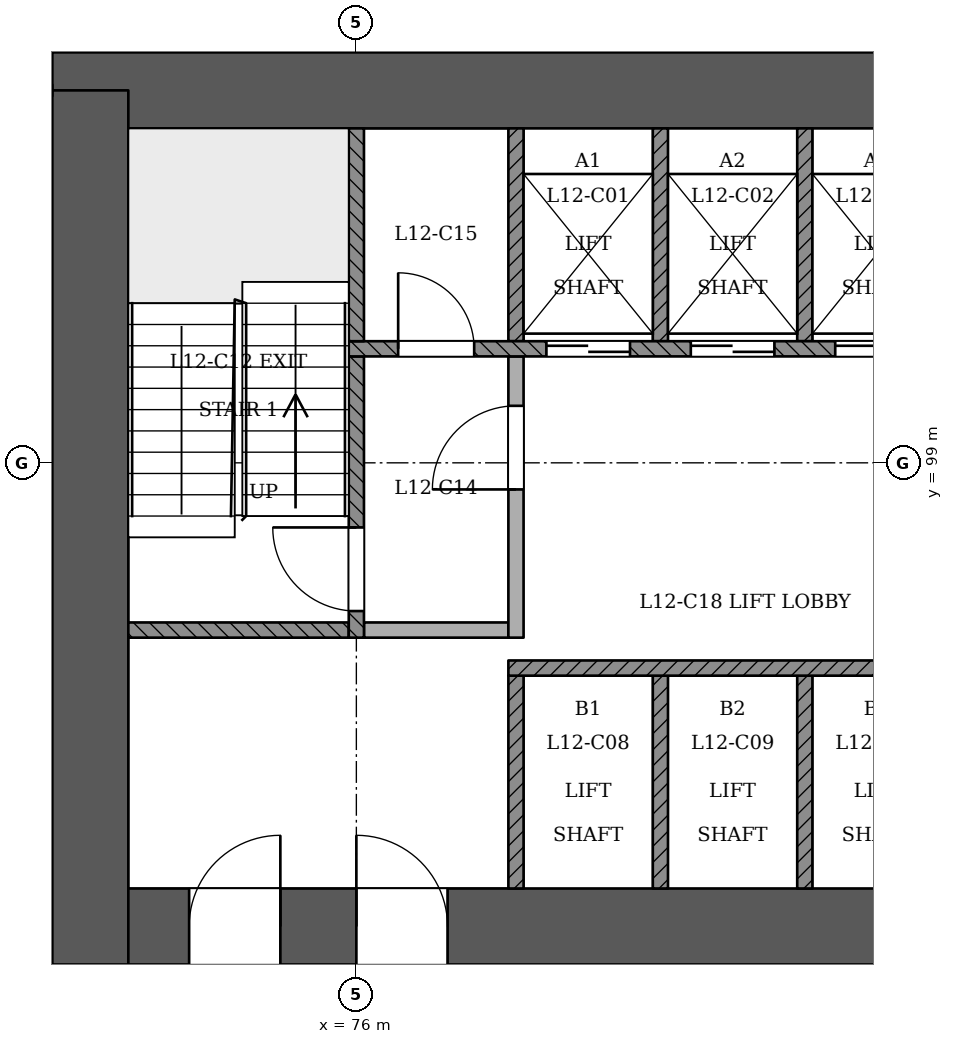
"""IFC4 building model, lengths in metres.
Left out: names, types, materials, properties, quantities, classifications, styles, units other than length and angle.
Written with IfcOpenShell. Run it as: python <this file> out.ifc"""

import sys

from ifc_helpers import new_model, si_unit, direction, frame, frame_2d, origin, place, context, subcontext, project, spatial, rectangle, extrude, element, fill, save


model = new_model("IFC4")
c1 = context("Model", 3, precision=1e-05, world=origin(), true_north=direction((0.0, 1.0)))
c2 = subcontext(c1, "Body", "Model", "MODEL_VIEW")
j1 = project(units=[si_unit("LENGTHUNIT", "METRE"), si_unit("PLANEANGLEUNIT", "RADIAN")], contexts=[c1])
p1 = place(None, origin())
s1 = spatial("IfcSite", under=j1, at=p1, CompositionType="ELEMENT")
p2 = place(p1, origin())
s2 = spatial("IfcBuilding", under=s1, at=p2, CompositionType="ELEMENT")
p3 = place(p2, frame((0.0, 0.0, 52.2)))
s3 = spatial("IfcBuildingStorey", under=s2, at=p3, CompositionType="ELEMENT", Elevation=52.2)
p4 = place(p3, frame((72.5, 92.9, 0.0), z_axis=(0.0, 0.0, 1.0), x_axis=(1.0, 0.0, 0.0)))
e1 = element("IfcWall", 1, at=p4, inside=s3, PredefinedType="SHEAR", context=c2, shape_type="SweptSolid", body=[
    extrude(rectangle(XDim=25.5, YDim=1.0, at=frame_2d((12.75, 0.0))), origin(), (0.0, 0.0, 1.0), 3.6),
])
p5 = place(p4, frame((1.3, 0.0, 0.0)))
e2 = element("IfcOpeningElement", 2, at=p5, cuts=e1, PredefinedType="OPENING", context=c2, shape_type="SweptSolid", body=[
    extrude(rectangle(XDim=1.2, YDim=2.1, at=frame_2d((0.6, 1.05))), frame((0.0, 0.51, 0.0), z_axis=(0.0, -1.0, 0.0), x_axis=(1.0, 0.0, 0.0)), (0.0, 0.0, 1.0), 1.021),
])
p6 = place(p4, frame((3.5, 0.0, 0.0)))
e3 = element("IfcOpeningElement", 3, at=p6, cuts=e1, PredefinedType="OPENING", context=c2, shape_type="SweptSolid", body=[
    extrude(rectangle(XDim=1.2, YDim=2.1, at=frame_2d((0.6, 1.05))), frame((0.0, 0.51, 0.0), z_axis=(0.0, -1.0, 0.0), x_axis=(1.0, 0.0, 0.0)), (0.0, 0.0, 1.0), 1.021),
])
p7 = place(p4, frame((13.5, 0.0, 0.0)))
e4 = element("IfcOpeningElement", 4, at=p7, cuts=e1, PredefinedType="OPENING", context=c2, shape_type="SweptSolid", body=[
    extrude(rectangle(XDim=1.2, YDim=2.1, at=frame_2d((0.6, 1.05))), frame((0.0, 0.51, 0.0), z_axis=(0.0, -1.0, 0.0), x_axis=(1.0, 0.0, 0.0)), (0.0, 0.0, 1.0), 1.021),
])
p8 = place(p4, frame((15.462, 0.0, 0.0)))
e5 = element("IfcOpeningElement", 5, at=p8, cuts=e1, PredefinedType="OPENING", context=c2, shape_type="SweptSolid", body=[
    extrude(rectangle(XDim=1.0, YDim=2.1, at=frame_2d((0.5, 1.05))), frame((0.0, 0.51, 0.0), z_axis=(0.0, -1.0, 0.0), x_axis=(1.0, 0.0, 0.0)), (0.0, 0.0, 1.0), 1.021),
])
p9 = place(p4, frame((18.3, 0.0, 0.0)))
e6 = element("IfcOpeningElement", 6, at=p9, cuts=e1, PredefinedType="OPENING", context=c2, shape_type="SweptSolid", body=[
    extrude(rectangle(XDim=1.0, YDim=2.1, at=frame_2d((0.5, 1.05))), frame((0.0, 0.51, 0.0), z_axis=(0.0, -1.0, 0.0), x_axis=(1.0, 0.0, 0.0)), (0.0, 0.0, 1.0), 1.021),
])
p10 = place(p4, frame((21.2, 0.0, 0.0)))
e7 = element("IfcOpeningElement", 7, at=p10, cuts=e1, PredefinedType="OPENING", context=c2, shape_type="SweptSolid", body=[
    extrude(rectangle(XDim=1.0, YDim=2.1, at=frame_2d((0.5, 1.05))), frame((0.0, 0.51, 0.0), z_axis=(0.0, -1.0, 0.0), x_axis=(1.0, 0.0, 0.0)), (0.0, 0.0, 1.0), 1.021),
])
p11 = place(p4, frame((23.087, 0.0, 0.0)))
e8 = element("IfcOpeningElement", 8, at=p11, cuts=e1, PredefinedType="OPENING", context=c2, shape_type="SweptSolid", body=[
    extrude(rectangle(XDim=1.0, YDim=2.1, at=frame_2d((0.5, 1.05))), frame((0.0, 0.51, 0.0), z_axis=(0.0, -1.0, 0.0), x_axis=(1.0, 0.0, 0.0)), (0.0, 0.0, 1.0), 1.021),
])
p12 = place(p3, frame((97.5, 103.9, 0.0), z_axis=(0.0, 0.0, 1.0), x_axis=(-1.0, 0.0, 0.0)))
e9 = element("IfcWall", 9, at=p12, inside=s3, PredefinedType="SHEAR", context=c2, shape_type="SweptSolid", body=[
    extrude(rectangle(XDim=25.5, YDim=1.0, at=frame_2d((12.75, 0.0))), origin(), (0.0, 0.0, 1.0), 3.6),
])
p13 = place(p3, frame((72.5, 103.9, 0.0), z_axis=(0.0, 0.0, 1.0), x_axis=(0.0, -1.0, 0.0)))
e10 = element("IfcWall", 10, at=p13, inside=s3, PredefinedType="SHEAR", context=c2, shape_type="SweptSolid", body=[
    extrude(rectangle(XDim=11.5, YDim=1.0, at=frame_2d((5.75, 0.0))), origin(), (0.0, 0.0, 1.0), 3.6),
])
p14 = place(p3, frame((64.002, 93.308, 0.0), z_axis=(0.0, 0.0, 1.0), x_axis=(0.49999948646, -0.866025700277, 0.0)))
e11 = element("IfcWall", 11, at=p14, inside=s3, PredefinedType="PARTITIONING", context=c2, shape_type="SweptSolid", body=[
    extrude(rectangle(XDim=38.6, YDim=0.15, at=frame_2d((19.3, 0.0))), origin(), (0.0, 0.0, 1.0), 2.7),
])
p15 = place(p14, frame((0.605, 0.0, 0.0)))
e12 = element("IfcOpeningElement", 12, at=p15, cuts=e11, PredefinedType="OPENING", context=c2, shape_type="SweptSolid", body=[
    extrude(rectangle(XDim=1.0, YDim=2.1, at=frame_2d((0.5, 1.05))), frame((0.0, 0.085, 0.0), z_axis=(0.0, -1.0, 0.0), x_axis=(1.0, 0.0, 0.0)), (0.0, 0.0, 1.0), 0.171),
])
p16 = place(p14, frame((7.28, 0.0, 0.0)))
e13 = element("IfcOpeningElement", 13, at=p16, cuts=e11, PredefinedType="OPENING", context=c2, shape_type="SweptSolid", body=[
    extrude(rectangle(XDim=1.0, YDim=2.1, at=frame_2d((0.5, 1.05))), frame((0.0, 0.085, 0.0), z_axis=(0.0, -1.0, 0.0), x_axis=(1.0, 0.0, 0.0)), (0.0, 0.0, 1.0), 0.171),
])
p17 = place(p14, frame((9.72, 0.0, 0.0)))
e14 = element("IfcOpeningElement", 14, at=p17, cuts=e11, PredefinedType="OPENING", context=c2, shape_type="SweptSolid", body=[
    extrude(rectangle(XDim=1.0, YDim=2.1, at=frame_2d((0.5, 1.05))), frame((0.0, 0.085, 0.0), z_axis=(0.0, -1.0, 0.0), x_axis=(1.0, 0.0, 0.0)), (0.0, 0.0, 1.0), 0.171),
])
p18 = place(p14, frame((16.395, 0.0, 0.0)))
e15 = element("IfcOpeningElement", 15, at=p18, cuts=e11, PredefinedType="OPENING", context=c2, shape_type="SweptSolid", body=[
    extrude(rectangle(XDim=1.0, YDim=2.1, at=frame_2d((0.5, 1.05))), frame((0.0, 0.085, 0.0), z_axis=(0.0, -1.0, 0.0), x_axis=(1.0, 0.0, 0.0)), (0.0, 0.0, 1.0), 0.171),
])
p19 = place(p14, frame((18.72, 0.0, 0.0)))
e16 = element("IfcOpeningElement", 16, at=p19, cuts=e11, PredefinedType="OPENING", context=c2, shape_type="SweptSolid", body=[
    extrude(rectangle(XDim=1.0, YDim=2.1, at=frame_2d((0.5, 1.05))), frame((0.0, 0.085, 0.0), z_axis=(0.0, -1.0, 0.0), x_axis=(1.0, 0.0, 0.0)), (0.0, 0.0, 1.0), 0.171),
])
p20 = place(p14, frame((25.395, 0.0, 0.0)))
e17 = element("IfcOpeningElement", 17, at=p20, cuts=e11, PredefinedType="OPENING", context=c2, shape_type="SweptSolid", body=[
    extrude(rectangle(XDim=1.0, YDim=2.1, at=frame_2d((0.5, 1.05))), frame((0.0, 0.085, 0.0), z_axis=(0.0, -1.0, 0.0), x_axis=(1.0, 0.0, 0.0)), (0.0, 0.0, 1.0), 0.171),
])
p21 = place(p14, frame((27.605, 0.0, 0.0)))
e18 = element("IfcOpeningElement", 18, at=p21, cuts=e11, PredefinedType="OPENING", context=c2, shape_type="SweptSolid", body=[
    extrude(rectangle(XDim=1.0, YDim=2.1, at=frame_2d((0.5, 1.05))), frame((0.0, 0.085, 0.0), z_axis=(0.0, -1.0, 0.0), x_axis=(1.0, 0.0, 0.0)), (0.0, 0.0, 1.0), 0.171),
])
p22 = place(p14, frame((34.28, 0.0, 0.0)))
e19 = element("IfcOpeningElement", 19, at=p22, cuts=e11, PredefinedType="OPENING", context=c2, shape_type="SweptSolid", body=[
    extrude(rectangle(XDim=1.0, YDim=2.1, at=frame_2d((0.5, 1.05))), frame((0.0, 0.085, 0.0), z_axis=(0.0, -1.0, 0.0), x_axis=(1.0, 0.0, 0.0)), (0.0, 0.0, 1.0), 0.171),
])
p23 = place(p14, frame((37.324, 0.0, 0.0)))
e20 = element("IfcOpeningElement", 20, at=p23, cuts=e11, PredefinedType="OPENING", context=c2, shape_type="SweptSolid", body=[
    extrude(rectangle(XDim=1.0, YDim=2.1, at=frame_2d((0.5, 1.05))), frame((0.0, 0.085, 0.0), z_axis=(0.0, -1.0, 0.0), x_axis=(1.0, 0.0, 0.0)), (0.0, 0.0, 1.0), 0.171),
])
for number, where, z_axis, x_axis in (
    (21, (78.1, 93.4, 0.0), (0.0, 0.0, 1.0), (0.0, 1.0, 0.0)),
    (22, (80.0, 93.4, 0.0), (0.0, 0.0, 1.0), (0.0, 1.0, 0.0)),
    (23, (81.9, 93.4, 0.0), (0.0, 0.0, 1.0), (0.0, 1.0, 0.0)),
):
    element("IfcWall", number, at=place(p3, frame(where, z_axis=z_axis, x_axis=x_axis)), inside=s3, PredefinedType="SOLIDWALL", context=c2, shape_type="SweptSolid", body=[
        extrude(rectangle(XDim=2.8, YDim=0.2, at=frame_2d((1.4, 0.0))), origin(), (0.0, 0.0, 1.0), 3.1),
    ])
p24 = place(p3, frame((78.0, 96.3, 0.0), z_axis=(0.0, 0.0, 1.0), x_axis=(1.0, 0.0, 0.0)))
e24 = element("IfcWall", 24, at=p24, inside=s3, PredefinedType="SOLIDWALL", context=c2, shape_type="SweptSolid", body=[
    extrude(rectangle(XDim=7.8, YDim=0.2, at=frame_2d((3.9, 0.0))), origin(), (0.0, 0.0, 1.0), 3.1),
])
p25 = place(p3, frame((73.0, 96.8, 0.0), z_axis=(0.0, 0.0, 1.0), x_axis=(1.0, 0.0, 0.0)))
e25 = element("IfcWall", 25, at=p25, inside=s3, PredefinedType="SOLIDWALL", context=c2, shape_type="SweptSolid", body=[
    extrude(rectangle(XDim=2.9, YDim=0.2, at=frame_2d((1.45, 0.0))), origin(), (0.0, 0.0, 1.0), 3.1),
])
p26 = place(p3, frame((76.0, 96.7, 0.0), z_axis=(0.0, 0.0, 1.0), x_axis=(0.0, 1.0, 0.0)))
e26 = element("IfcWall", 26, at=p26, inside=s3, PredefinedType="SOLIDWALL", context=c2, shape_type="SweptSolid", body=[
    extrude(rectangle(XDim=3.7, YDim=0.2, at=frame_2d((1.85, 0.0))), origin(), (0.0, 0.0, 1.0), 3.1),
])
p27 = place(p26, frame((0.35, 0.0, 0.0)))
e27 = element("IfcOpeningElement", 27, at=p27, cuts=e26, PredefinedType="OPENING", context=c2, shape_type="SweptSolid", body=[
    extrude(rectangle(XDim=1.1, YDim=2.1, at=frame_2d((0.55, 1.05))), frame((0.0, 0.11, 0.0), z_axis=(0.0, -1.0, 0.0), x_axis=(1.0, 0.0, 0.0)), (0.0, 0.0, 1.0), 0.221),
])
p28 = place(p3, frame((76.1, 96.8, 0.0), z_axis=(0.0, 0.0, 1.0), x_axis=(1.0, 0.0, 0.0)))
e28 = element("IfcWall", 28, at=p28, inside=s3, PredefinedType="PARTITIONING", context=c2, shape_type="SweptSolid", body=[
    extrude(rectangle(XDim=1.9, YDim=0.2, at=frame_2d((0.95, 0.0))), origin(), (0.0, 0.0, 1.0), 3.1),
])
p29 = place(p3, frame((78.1, 96.7, 0.0), z_axis=(0.0, 0.0, 1.0), x_axis=(0.0, 1.0, 0.0)))
e29 = element("IfcWall", 29, at=p29, inside=s3, PredefinedType="PARTITIONING", context=c2, shape_type="SweptSolid", body=[
    extrude(rectangle(XDim=3.7, YDim=0.2, at=frame_2d((1.85, 0.0))), origin(), (0.0, 0.0, 1.0), 3.1),
])
p30 = place(p29, frame((1.95, 0.0, 0.0)))
e30 = element("IfcOpeningElement", 30, at=p30, cuts=e29, PredefinedType="OPENING", context=c2, shape_type="SweptSolid", body=[
    extrude(rectangle(XDim=1.1, YDim=2.1, at=frame_2d((0.55, 1.05))), frame((0.0, 0.11, 0.0), z_axis=(0.0, -1.0, 0.0), x_axis=(1.0, 0.0, 0.0)), (0.0, 0.0, 1.0), 0.221),
])
p31 = place(p3, frame((75.9, 100.5, 0.0), z_axis=(0.0, 0.0, 1.0), x_axis=(1.0, 0.0, 0.0)))
e31 = element("IfcWall", 31, at=p31, inside=s3, PredefinedType="SOLIDWALL", context=c2, shape_type="SweptSolid", body=[
    extrude(rectangle(XDim=18.2, YDim=0.2, at=frame_2d((9.1, 0.0))), origin(), (0.0, 0.0, 1.0), 3.1),
])
p32 = place(p31, frame((2.6, 0.0, 0.0)))
e32 = element("IfcOpeningElement", 32, at=p32, cuts=e31, PredefinedType="OPENING", context=c2, shape_type="SweptSolid", body=[
    extrude(rectangle(XDim=1.1, YDim=2.1, at=frame_2d((0.55, 1.05))), frame((0.0, 0.11, 0.0), z_axis=(0.0, -1.0, 0.0), x_axis=(1.0, 0.0, 0.0)), (0.0, 0.0, 1.0), 0.221),
])
p33 = place(p31, frame((4.5, 0.0, 0.0)))
e33 = element("IfcOpeningElement", 33, at=p33, cuts=e31, PredefinedType="OPENING", context=c2, shape_type="SweptSolid", body=[
    extrude(rectangle(XDim=1.1, YDim=2.1, at=frame_2d((0.55, 1.05))), frame((0.0, 0.11, 0.0), z_axis=(0.0, -1.0, 0.0), x_axis=(1.0, 0.0, 0.0)), (0.0, 0.0, 1.0), 0.221),
])
p34 = place(p31, frame((6.4, 0.0, 0.0)))
e34 = element("IfcOpeningElement", 34, at=p34, cuts=e31, PredefinedType="OPENING", context=c2, shape_type="SweptSolid", body=[
    extrude(rectangle(XDim=1.1, YDim=2.1, at=frame_2d((0.55, 1.05))), frame((0.0, 0.11, 0.0), z_axis=(0.0, -1.0, 0.0), x_axis=(1.0, 0.0, 0.0)), (0.0, 0.0, 1.0), 0.221),
])
p35 = place(p31, frame((8.3, 0.0, 0.0)))
e35 = element("IfcOpeningElement", 35, at=p35, cuts=e31, PredefinedType="OPENING", context=c2, shape_type="SweptSolid", body=[
    extrude(rectangle(XDim=1.1, YDim=2.1, at=frame_2d((0.55, 1.05))), frame((0.0, 0.11, 0.0), z_axis=(0.0, -1.0, 0.0), x_axis=(1.0, 0.0, 0.0)), (0.0, 0.0, 1.0), 0.221),
])
p36 = place(p31, frame((10.2, 0.0, 0.0)))
e36 = element("IfcOpeningElement", 36, at=p36, cuts=e31, PredefinedType="OPENING", context=c2, shape_type="SweptSolid", body=[
    extrude(rectangle(XDim=1.1, YDim=2.1, at=frame_2d((0.55, 1.05))), frame((0.0, 0.11, 0.0), z_axis=(0.0, -1.0, 0.0), x_axis=(1.0, 0.0, 0.0)), (0.0, 0.0, 1.0), 0.221),
])
p37 = place(p31, frame((12.1, 0.0, 0.0)))
e37 = element("IfcOpeningElement", 37, at=p37, cuts=e31, PredefinedType="OPENING", context=c2, shape_type="SweptSolid", body=[
    extrude(rectangle(XDim=1.1, YDim=2.1, at=frame_2d((0.55, 1.05))), frame((0.0, 0.11, 0.0), z_axis=(0.0, -1.0, 0.0), x_axis=(1.0, 0.0, 0.0)), (0.0, 0.0, 1.0), 0.221),
])
p38 = place(p31, frame((14.0, 0.0, 0.0)))
e38 = element("IfcOpeningElement", 38, at=p38, cuts=e31, PredefinedType="OPENING", context=c2, shape_type="SweptSolid", body=[
    extrude(rectangle(XDim=1.1, YDim=2.1, at=frame_2d((0.55, 1.05))), frame((0.0, 0.11, 0.0), z_axis=(0.0, -1.0, 0.0), x_axis=(1.0, 0.0, 0.0)), (0.0, 0.0, 1.0), 0.221),
])
p39 = place(p31, frame((0.65, 0.0, 0.0)))
e39 = element("IfcOpeningElement", 39, at=p39, cuts=e31, PredefinedType="OPENING", context=c2, shape_type="SweptSolid", body=[
    extrude(rectangle(XDim=1.0, YDim=2.1, at=frame_2d((0.5, 1.05))), frame((0.0, 0.11, 0.0), z_axis=(0.0, -1.0, 0.0), x_axis=(1.0, 0.0, 0.0)), (0.0, 0.0, 1.0), 0.221),
])
p40 = place(p31, frame((16.3, 0.0, 0.0)))
e40 = element("IfcOpeningElement", 40, at=p40, cuts=e31, PredefinedType="OPENING", context=c2, shape_type="SweptSolid", body=[
    extrude(rectangle(XDim=1.0, YDim=2.1, at=frame_2d((0.5, 1.05))), frame((0.0, 0.11, 0.0), z_axis=(0.0, -1.0, 0.0), x_axis=(1.0, 0.0, 0.0)), (0.0, 0.0, 1.0), 0.221),
])
for number, where, z_axis, x_axis in (
    (41, (76.0, 100.6, 0.0), (0.0, 0.0, 1.0), (0.0, 1.0, 0.0)),
    (42, (78.1, 100.6, 0.0), (0.0, 0.0, 1.0), (0.0, 1.0, 0.0)),
    (43, (80.0, 100.6, 0.0), (0.0, 0.0, 1.0), (0.0, 1.0, 0.0)),
    (44, (81.9, 100.6, 0.0), (0.0, 0.0, 1.0), (0.0, 1.0, 0.0)),
):
    element("IfcWall", number, at=place(p3, frame(where, z_axis=z_axis, x_axis=x_axis)), inside=s3, PredefinedType="SOLIDWALL", context=c2, shape_type="SweptSolid", body=[
        extrude(rectangle(XDim=2.8, YDim=0.2, at=frame_2d((1.4, 0.0))), origin(), (0.0, 0.0, 1.0), 3.1),
    ])
p41 = place(p32, origin())
e45 = element("IfcDoor", 45, at=p41, inside=s3, OperationType="SLIDING_TO_RIGHT", PredefinedType="NOTDEFINED", context=c2, shape_type="SweptSolid", body=[
    extrude(rectangle(XDim=1.1, YDim=2.1, at=frame_2d((0.55, 1.05))), frame((0.0, 0.025, 0.0), z_axis=(0.0, -1.0, 0.0), x_axis=(1.0, 0.0, 0.0)), (0.0, 0.0, 1.0), 0.05),
])
fill(e32, e45)
p42 = place(p33, origin())
e46 = element("IfcDoor", 46, at=p42, inside=s3, OperationType="SLIDING_TO_LEFT", PredefinedType="NOTDEFINED", context=c2, shape_type="SweptSolid", body=[
    extrude(rectangle(XDim=1.1, YDim=2.1, at=frame_2d((0.55, 1.05))), frame((0.0, 0.025, 0.0), z_axis=(0.0, -1.0, 0.0), x_axis=(1.0, 0.0, 0.0)), (0.0, 0.0, 1.0), 0.05),
])
fill(e33, e46)
p43 = place(p34, origin())
e47 = element("IfcDoor", 47, at=p43, inside=s3, OperationType="SLIDING_TO_RIGHT", PredefinedType="NOTDEFINED", context=c2, shape_type="SweptSolid", body=[
    extrude(rectangle(XDim=1.1, YDim=2.1, at=frame_2d((0.55, 1.05))), frame((0.0, 0.025, 0.0), z_axis=(0.0, -1.0, 0.0), x_axis=(1.0, 0.0, 0.0)), (0.0, 0.0, 1.0), 0.05),
])
fill(e34, e47)
p44 = place(p27, origin())
e48 = element("IfcDoor", 48, at=p44, inside=s3, OperationType="SINGLE_SWING_RIGHT", PredefinedType="NOTDEFINED", context=c2, shape_type="SweptSolid", body=[
    extrude(rectangle(XDim=1.1, YDim=2.1, at=frame_2d((0.55, 1.05))), frame((0.0, 0.025, 0.0), z_axis=(0.0, -1.0, 0.0), x_axis=(1.0, 0.0, 0.0)), (0.0, 0.0, 1.0), 0.05),
])
fill(e27, e48)
p45 = place(p30, origin())
e49 = element("IfcDoor", 49, at=p45, inside=s3, OperationType="SINGLE_SWING_LEFT", PredefinedType="NOTDEFINED", context=c2, shape_type="SweptSolid", body=[
    extrude(rectangle(XDim=1.1, YDim=2.1, at=frame_2d((0.55, 1.05))), frame((0.0, 0.025, 0.0), z_axis=(0.0, -1.0, 0.0), x_axis=(1.0, 0.0, 0.0)), (0.0, 0.0, 1.0), 0.05),
])
fill(e30, e49)
p46 = place(p5, origin())
e50 = element("IfcDoor", 50, at=p46, inside=s3, OperationType="SINGLE_SWING_RIGHT", PredefinedType="NOTDEFINED", context=c2, shape_type="SweptSolid", body=[
    extrude(rectangle(XDim=1.2, YDim=2.1, at=frame_2d((0.6, 1.05))), frame((0.0, 0.025, 0.0), z_axis=(0.0, -1.0, 0.0), x_axis=(1.0, 0.0, 0.0)), (0.0, 0.0, 1.0), 0.05),
])
fill(e2, e50)
p47 = place(p6, origin())
e51 = element("IfcDoor", 51, at=p47, inside=s3, OperationType="SINGLE_SWING_LEFT", PredefinedType="NOTDEFINED", context=c2, shape_type="SweptSolid", body=[
    extrude(rectangle(XDim=1.2, YDim=2.1, at=frame_2d((0.6, 1.05))), frame((0.0, 0.025, 0.0), z_axis=(0.0, -1.0, 0.0), x_axis=(1.0, 0.0, 0.0)), (0.0, 0.0, 1.0), 0.05),
])
fill(e3, e51)
p48 = place(p39, origin())
e52 = element("IfcDoor", 52, at=p48, inside=s3, OperationType="SINGLE_SWING_LEFT", PredefinedType="NOTDEFINED", context=c2, shape_type="SweptSolid", body=[
    extrude(rectangle(XDim=1.0, YDim=2.1, at=frame_2d((0.5, 1.05))), frame((0.0, 0.025, 0.0), z_axis=(0.0, -1.0, 0.0), x_axis=(1.0, 0.0, 0.0)), (0.0, 0.0, 1.0), 0.05),
])
fill(e39, e52)
save(model, sys.argv[1])
